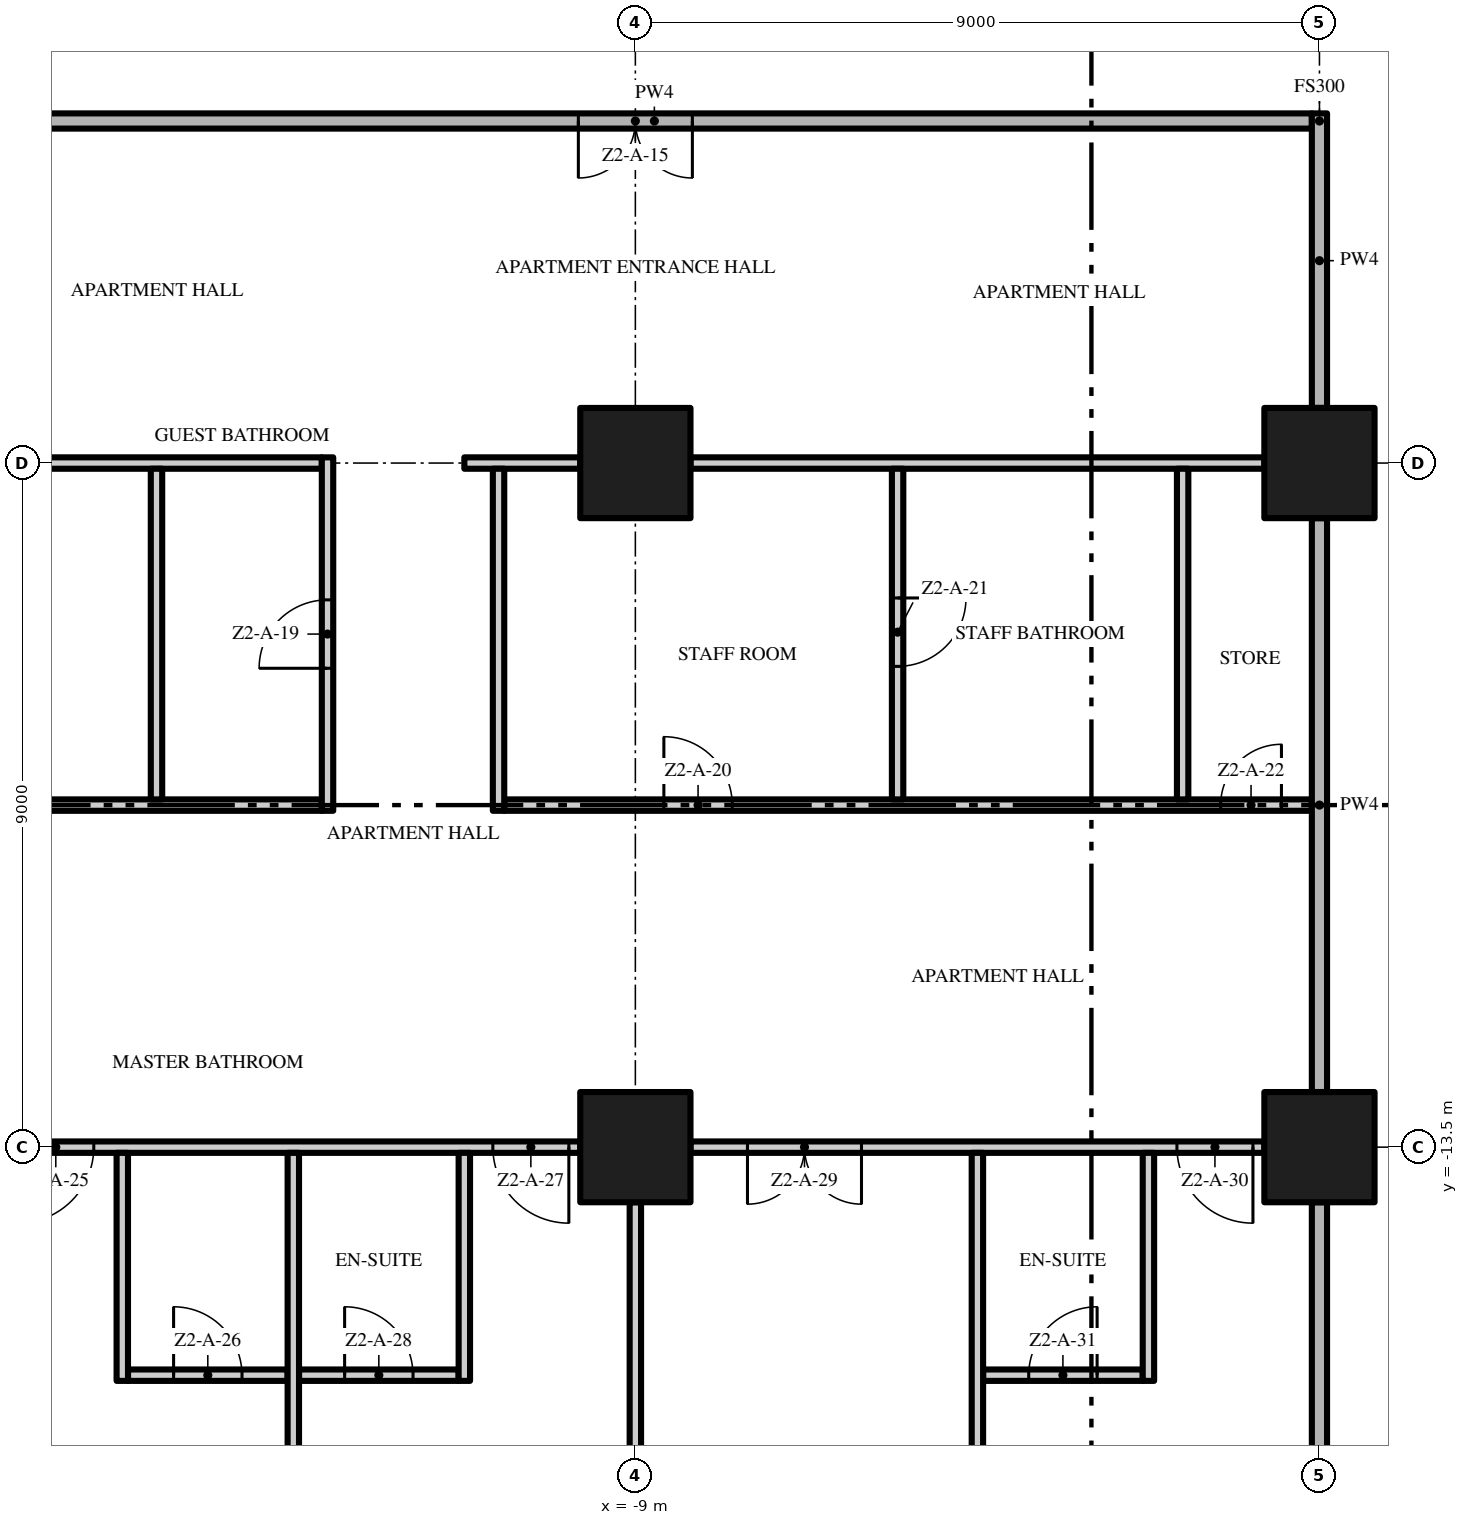
"""IFC4 building model, lengths in metres.
Left out: names, types, materials, properties, quantities, classifications, styles, units other than length and angle.
Written with IfcOpenShell. Run it as: python <this file> out.ifc"""

import sys

from ifc_helpers import new_model, si_unit, direction, frame, frame_2d, origin, origin_2d, place, context, subcontext, project, spatial, rectangle, extrude, element, fill, save


model = new_model("IFC4")
c1 = context("Model", 3, precision=1e-05, world=origin(), true_north=direction((0.0, 1.0)))
c2 = subcontext(c1, "Body", "Model", "MODEL_VIEW")
j1 = project(units=[si_unit("LENGTHUNIT", "METRE"), si_unit("PLANEANGLEUNIT", "RADIAN")], contexts=[c1])
p1 = place(None, origin())
s1 = spatial("IfcSite", under=j1, at=p1, CompositionType="ELEMENT")
p2 = place(p1, origin())
s2 = spatial("IfcBuilding", under=s1, at=p2, CompositionType="ELEMENT")
p3 = place(p2, frame((0.0, 0.0, 77.0)))
s3 = spatial("IfcBuildingStorey", under=s2, at=p3, CompositionType="ELEMENT", Elevation=77.0)
for number, where, z_axis, x_axis in (
    (1, (-9.0, -13.5, 0.0), (0.0, 0.0, 1.0), (1.0, 0.0, 0.0)),
    (2, (-9.0, -4.5, 0.0), (0.0, 0.0, 1.0), (1.0, 0.0, 0.0)),
    (3, (0.0, -13.5, 0.0), (0.0, 0.0, 1.0), (1.0, 0.0, 0.0)),
    (4, (0.0, -4.5, 0.0), (0.0, 0.0, 1.0), (1.0, 0.0, 0.0)),
):
    element("IfcColumn", number, at=place(p3, frame(where, z_axis=z_axis, x_axis=x_axis)), inside=s3, PredefinedType="COLUMN", context=c2, shape_type="SweptSolid", body=[
        extrude(rectangle(XDim=1.45, YDim=1.45, at=origin_2d()), origin(), (0.0, 0.0, 1.0), 3.5),
    ])
p4 = place(p3, frame((-15.675, -16.5, 0.0), z_axis=(0.0, 0.0, 1.0), x_axis=(1.0, 0.0, 0.0)))
e5 = element("IfcWall", 5, at=p4, inside=s3, PredefinedType="PARTITIONING", context=c2, shape_type="SweptSolid", body=[
    extrude(rectangle(XDim=2.1, YDim=0.15, at=frame_2d((1.05, 0.0))), origin(), (0.0, 0.0, 1.0), 3.5),
])
p5 = place(p4, frame((0.6, 0.0, 0.0)))
e6 = element("IfcOpeningElement", 6, at=p5, cuts=e5, PredefinedType="OPENING", context=c2, shape_type="SweptSolid", body=[
    extrude(rectangle(XDim=0.9, YDim=2.1, at=frame_2d((0.45, 1.05))), frame((0.0, 0.085, 0.0), z_axis=(0.0, -1.0, 0.0), x_axis=(1.0, 0.0, 0.0)), (0.0, 0.0, 1.0), 0.17),
])
p6 = place(p3, frame((-13.425, -16.5, 0.0), z_axis=(0.0, 0.0, 1.0), x_axis=(1.0, 0.0, 0.0)))
e7 = element("IfcWall", 7, at=p6, inside=s3, PredefinedType="PARTITIONING", context=c2, shape_type="SweptSolid", body=[
    extrude(rectangle(XDim=2.1, YDim=0.15, at=frame_2d((1.05, 0.0))), origin(), (0.0, 0.0, 1.0), 3.5),
])
p7 = place(p6, frame((0.6, 0.0, 0.0)))
e8 = element("IfcOpeningElement", 8, at=p7, cuts=e7, PredefinedType="OPENING", context=c2, shape_type="SweptSolid", body=[
    extrude(rectangle(XDim=0.9, YDim=2.1, at=frame_2d((0.45, 1.05))), frame((0.0, 0.085, 0.0), z_axis=(0.0, -1.0, 0.0), x_axis=(1.0, 0.0, 0.0)), (0.0, 0.0, 1.0), 0.17),
])
p8 = place(p3, frame((-4.425, -16.5, 0.0), z_axis=(0.0, 0.0, 1.0), x_axis=(1.0, 0.0, 0.0)))
e9 = element("IfcWall", 9, at=p8, inside=s3, PredefinedType="PARTITIONING", context=c2, shape_type="SweptSolid", body=[
    extrude(rectangle(XDim=2.1, YDim=0.15, at=frame_2d((1.05, 0.0))), origin(), (0.0, 0.0, 1.0), 3.5),
])
p9 = place(p8, frame((0.6, 0.0, 0.0)))
e10 = element("IfcOpeningElement", 10, at=p9, cuts=e9, PredefinedType="OPENING", context=c2, shape_type="SweptSolid", body=[
    extrude(rectangle(XDim=0.9, YDim=2.1, at=frame_2d((0.45, 1.05))), frame((0.0, 0.085, 0.0), z_axis=(0.0, -1.0, 0.0), x_axis=(1.0, 0.0, 0.0)), (0.0, 0.0, 1.0), 0.17),
])
p10 = place(p3, frame((-9.725, -13.5, 0.0), z_axis=(0.0, 0.0, 1.0), x_axis=(-1.0, 0.0, 0.0)))
e11 = element("IfcWall", 11, at=p10, inside=s3, PredefinedType="PARTITIONING", context=c2, shape_type="SweptSolid", body=[
    extrude(rectangle(XDim=7.55, YDim=0.15, at=frame_2d((3.775, 0.0))), origin(), (0.0, 0.0, 1.0), 3.5),
])
p11 = place(p10, frame((6.4, 0.0, 0.0)))
e12 = element("IfcOpeningElement", 12, at=p11, cuts=e11, PredefinedType="OPENING", context=c2, shape_type="SweptSolid", body=[
    extrude(rectangle(XDim=1.0, YDim=2.4, at=frame_2d((0.5, 1.2))), frame((0.0, 0.085, 0.0), z_axis=(0.0, -1.0, 0.0), x_axis=(1.0, 0.0, 0.0)), (0.0, 0.0, 1.0), 0.17),
])
p12 = place(p10, frame((0.15, 0.0, 0.0)))
e13 = element("IfcOpeningElement", 13, at=p12, cuts=e11, PredefinedType="OPENING", context=c2, shape_type="SweptSolid", body=[
    extrude(rectangle(XDim=1.0, YDim=2.4, at=frame_2d((0.5, 1.2))), frame((0.0, 0.085, 0.0), z_axis=(0.0, -1.0, 0.0), x_axis=(1.0, 0.0, 0.0)), (0.0, 0.0, 1.0), 0.17),
])
p13 = place(p3, frame((-0.725, -13.5, 0.0), z_axis=(0.0, 0.0, 1.0), x_axis=(-1.0, 0.0, 0.0)))
e14 = element("IfcWall", 14, at=p13, inside=s3, PredefinedType="PARTITIONING", context=c2, shape_type="SweptSolid", body=[
    extrude(rectangle(XDim=7.55, YDim=0.15, at=frame_2d((3.775, 0.0))), origin(), (0.0, 0.0, 1.0), 3.5),
])
p14 = place(p13, frame((5.3, 0.0, 0.0)))
e15 = element("IfcOpeningElement", 15, at=p14, cuts=e14, PredefinedType="OPENING", context=c2, shape_type="SweptSolid", body=[
    extrude(rectangle(XDim=1.5, YDim=2.4, at=frame_2d((0.75, 1.2))), frame((0.0, 0.085, 0.0), z_axis=(0.0, -1.0, 0.0), x_axis=(1.0, 0.0, 0.0)), (0.0, 0.0, 1.0), 0.17),
])
p15 = place(p13, frame((0.15, 0.0, 0.0)))
e16 = element("IfcOpeningElement", 16, at=p15, cuts=e14, PredefinedType="OPENING", context=c2, shape_type="SweptSolid", body=[
    extrude(rectangle(XDim=1.0, YDim=2.4, at=frame_2d((0.5, 1.2))), frame((0.0, 0.085, 0.0), z_axis=(0.0, -1.0, 0.0), x_axis=(1.0, 0.0, 0.0)), (0.0, 0.0, 1.0), 0.17),
])
p16 = place(p3, frame((-26.7, -9.0, 0.0), z_axis=(0.0, 0.0, 1.0), x_axis=(1.0, 0.0, 0.0)))
e17 = element("IfcWall", 17, at=p16, inside=s3, PredefinedType="PARTITIONING", context=c2, shape_type="SweptSolid", body=[
    extrude(rectangle(XDim=13.575, YDim=0.15, at=frame_2d((6.787, 0.0))), origin(), (0.0, 0.0, 1.0), 3.5),
])
p17 = place(p3, frame((-10.725, -9.0, 0.0), z_axis=(0.0, 0.0, 1.0), x_axis=(1.0, 0.0, 0.0)))
e18 = element("IfcWall", 18, at=p17, inside=s3, PredefinedType="PARTITIONING", context=c2, shape_type="SweptSolid", body=[
    extrude(rectangle(XDim=10.625, YDim=0.15, at=frame_2d((5.312, 0.0))), origin(), (0.0, 0.0, 1.0), 3.5),
])
p18 = place(p17, frame((2.1, 0.0, 0.0)))
e19 = element("IfcOpeningElement", 19, at=p18, cuts=e18, PredefinedType="OPENING", context=c2, shape_type="SweptSolid", body=[
    extrude(rectangle(XDim=0.9, YDim=2.1, at=frame_2d((0.45, 1.05))), frame((0.0, 0.085, 0.0), z_axis=(0.0, -1.0, 0.0), x_axis=(1.0, 0.0, 0.0)), (0.0, 0.0, 1.0), 0.17),
])
p19 = place(p17, frame((9.425, 0.0, 0.0)))
e20 = element("IfcOpeningElement", 20, at=p19, cuts=e18, PredefinedType="OPENING", context=c2, shape_type="SweptSolid", body=[
    extrude(rectangle(XDim=0.8, YDim=2.0, at=frame_2d((0.4, 1.0))), frame((0.0, 0.085, 0.0), z_axis=(0.0, -1.0, 0.0), x_axis=(1.0, 0.0, 0.0)), (0.0, 0.0, 1.0), 0.17),
])
p20 = place(p3, frame((-17.275, -4.5, 0.0), z_axis=(0.0, 0.0, 1.0), x_axis=(1.0, 0.0, 0.0)))
e21 = element("IfcWall", 21, at=p20, inside=s3, PredefinedType="PARTITIONING", context=c2, shape_type="SweptSolid", body=[
    extrude(rectangle(XDim=4.15, YDim=0.15, at=frame_2d((2.075, 0.0))), origin(), (0.0, 0.0, 1.0), 3.5),
])
p21 = place(p3, frame((-11.25, -4.5, 0.0), z_axis=(0.0, 0.0, 1.0), x_axis=(1.0, 0.0, 0.0)))
e22 = element("IfcWall", 22, at=p21, inside=s3, PredefinedType="PARTITIONING", context=c2, shape_type="SweptSolid", body=[
    extrude(rectangle(XDim=1.525, YDim=0.15, at=frame_2d((0.762, 0.0))), origin(), (0.0, 0.0, 1.0), 3.5),
])
p22 = place(p3, frame((-8.275, -4.5, 0.0), z_axis=(0.0, 0.0, 1.0), x_axis=(1.0, 0.0, 0.0)))
e23 = element("IfcWall", 23, at=p22, inside=s3, PredefinedType="PARTITIONING", context=c2, shape_type="SweptSolid", body=[
    extrude(rectangle(XDim=7.55, YDim=0.15, at=frame_2d((3.775, 0.0))), origin(), (0.0, 0.0, 1.0), 3.5),
])
p23 = place(p3, frame((-0.1, 0.0, 0.0), z_axis=(0.0, 0.0, 1.0), x_axis=(-1.0, 0.0, 0.0)))
e24 = element("IfcWall", 24, at=p23, inside=s3, PredefinedType="PARTITIONING", context=c2, shape_type="SweptSolid", body=[
    extrude(rectangle(XDim=17.3, YDim=0.2, at=frame_2d((8.65, 0.0))), origin(), (0.0, 0.0, 1.0), 3.5),
])
p24 = place(p23, frame((8.15, 0.0, 0.0)))
e25 = element("IfcOpeningElement", 25, at=p24, cuts=e24, PredefinedType="OPENING", context=c2, shape_type="SweptSolid", body=[
    extrude(rectangle(XDim=1.5, YDim=2.4, at=frame_2d((0.75, 1.2))), frame((0.0, 0.11, 0.0), z_axis=(0.0, -1.0, 0.0), x_axis=(1.0, 0.0, 0.0)), (0.0, 0.0, 1.0), 0.22),
])
p25 = place(p3, frame((-15.75, -16.575, 0.0), z_axis=(0.0, 0.0, 1.0), x_axis=(0.0, 1.0, 0.0)))
e26 = element("IfcWall", 26, at=p25, inside=s3, PredefinedType="PARTITIONING", context=c2, shape_type="SweptSolid", body=[
    extrude(rectangle(XDim=3.0, YDim=0.15, at=frame_2d((1.5, 0.0))), origin(), (0.0, 0.0, 1.0), 3.5),
])
p26 = place(p3, frame((-15.3, -8.925, 0.0), z_axis=(0.0, 0.0, 1.0), x_axis=(0.0, 1.0, 0.0)))
e27 = element("IfcWall", 27, at=p26, inside=s3, PredefinedType="PARTITIONING", context=c2, shape_type="SweptSolid", body=[
    extrude(rectangle(XDim=4.35, YDim=0.15, at=frame_2d((2.175, 0.0))), origin(), (0.0, 0.0, 1.0), 3.5),
])
p27 = place(p3, frame((-13.5, -22.2, 0.0), z_axis=(0.0, 0.0, 1.0), x_axis=(0.0, 1.0, 0.0)))
e28 = element("IfcWall", 28, at=p27, inside=s3, PredefinedType="PARTITIONING", context=c2, shape_type="SweptSolid", body=[
    extrude(rectangle(XDim=8.625, YDim=0.15, at=frame_2d((4.312, 0.0))), origin(), (0.0, 0.0, 1.0), 3.5),
])
p28 = place(p3, frame((-13.05, -9.075, 0.0), z_axis=(0.0, 0.0, 1.0), x_axis=(0.0, 1.0, 0.0)))
e29 = element("IfcWall", 29, at=p28, inside=s3, PredefinedType="PARTITIONING", context=c2, shape_type="SweptSolid", body=[
    extrude(rectangle(XDim=4.65, YDim=0.15, at=frame_2d((2.325, 0.0))), origin(), (0.0, 0.0, 1.0), 3.5),
])
p29 = place(p28, frame((1.875, 0.0, 0.0)))
e30 = element("IfcOpeningElement", 30, at=p29, cuts=e29, PredefinedType="OPENING", context=c2, shape_type="SweptSolid", body=[
    extrude(rectangle(XDim=0.9, YDim=2.1, at=frame_2d((0.45, 1.05))), frame((0.0, 0.085, 0.0), z_axis=(0.0, -1.0, 0.0), x_axis=(1.0, 0.0, 0.0)), (0.0, 0.0, 1.0), 0.17),
])
p30 = place(p3, frame((-11.25, -16.575, 0.0), z_axis=(0.0, 0.0, 1.0), x_axis=(0.0, 1.0, 0.0)))
e31 = element("IfcWall", 31, at=p30, inside=s3, PredefinedType="PARTITIONING", context=c2, shape_type="SweptSolid", body=[
    extrude(rectangle(XDim=3.0, YDim=0.15, at=frame_2d((1.5, 0.0))), origin(), (0.0, 0.0, 1.0), 3.5),
])
p31 = place(p3, frame((-10.8, -9.075, 0.0), z_axis=(0.0, 0.0, 1.0), x_axis=(0.0, 1.0, 0.0)))
e32 = element("IfcWall", 32, at=p31, inside=s3, PredefinedType="PARTITIONING", context=c2, shape_type="SweptSolid", body=[
    extrude(rectangle(XDim=4.5, YDim=0.15, at=frame_2d((2.25, 0.0))), origin(), (0.0, 0.0, 1.0), 3.5),
])
p32 = place(p3, frame((-9.0, -21.15, 0.0), z_axis=(0.0, 0.0, 1.0), x_axis=(0.0, 1.0, 0.0)))
e33 = element("IfcWall", 33, at=p32, inside=s3, PredefinedType="PARTITIONING", context=c2, shape_type="SweptSolid", body=[
    extrude(rectangle(XDim=6.925, YDim=0.15, at=frame_2d((3.462, 0.0))), origin(), (0.0, 0.0, 1.0), 3.5),
])
p33 = place(p3, frame((-5.55, -4.575, 0.0), z_axis=(0.0, 0.0, 1.0), x_axis=(0.0, -1.0, 0.0)))
e34 = element("IfcWall", 34, at=p33, inside=s3, PredefinedType="PARTITIONING", context=c2, shape_type="SweptSolid", body=[
    extrude(rectangle(XDim=4.35, YDim=0.15, at=frame_2d((2.175, 0.0))), origin(), (0.0, 0.0, 1.0), 3.5),
])
p34 = place(p33, frame((1.7, 0.0, 0.0)))
e35 = element("IfcOpeningElement", 35, at=p34, cuts=e34, PredefinedType="OPENING", context=c2, shape_type="SweptSolid", body=[
    extrude(rectangle(XDim=0.9, YDim=2.1, at=frame_2d((0.45, 1.05))), frame((0.0, 0.085, 0.0), z_axis=(0.0, -1.0, 0.0), x_axis=(1.0, 0.0, 0.0)), (0.0, 0.0, 1.0), 0.17),
])
p35 = place(p3, frame((-4.5, -22.2, 0.0), z_axis=(0.0, 0.0, 1.0), x_axis=(0.0, 1.0, 0.0)))
e36 = element("IfcWall", 36, at=p35, inside=s3, PredefinedType="PARTITIONING", context=c2, shape_type="SweptSolid", body=[
    extrude(rectangle(XDim=8.625, YDim=0.15, at=frame_2d((4.312, 0.0))), origin(), (0.0, 0.0, 1.0), 3.5),
])
p36 = place(p3, frame((-2.25, -16.575, 0.0), z_axis=(0.0, 0.0, 1.0), x_axis=(0.0, 1.0, 0.0)))
e37 = element("IfcWall", 37, at=p36, inside=s3, PredefinedType="PARTITIONING", context=c2, shape_type="SweptSolid", body=[
    extrude(rectangle(XDim=3.0, YDim=0.15, at=frame_2d((1.5, 0.0))), origin(), (0.0, 0.0, 1.0), 3.5),
])
p37 = place(p3, frame((-1.8, -8.925, 0.0), z_axis=(0.0, 0.0, 1.0), x_axis=(0.0, 1.0, 0.0)))
e38 = element("IfcWall", 38, at=p37, inside=s3, PredefinedType="PARTITIONING", context=c2, shape_type="SweptSolid", body=[
    extrude(rectangle(XDim=4.35, YDim=0.15, at=frame_2d((2.175, 0.0))), origin(), (0.0, 0.0, 1.0), 3.5),
])
p38 = place(p3, frame((0.0, -21.15, 0.0), z_axis=(0.0, 0.0, 1.0), x_axis=(0.0, 1.0, 0.0)))
e39 = element("IfcWall", 39, at=p38, inside=s3, PredefinedType="PARTITIONING", context=c2, shape_type="SweptSolid", body=[
    extrude(rectangle(XDim=6.925, YDim=0.2, at=frame_2d((3.462, 0.0))), origin(), (0.0, 0.0, 1.0), 3.5),
])
p39 = place(p3, frame((0.0, -12.775, 0.0), z_axis=(0.0, 0.0, 1.0), x_axis=(0.0, 1.0, 0.0)))
e40 = element("IfcWall", 40, at=p39, inside=s3, PredefinedType="PARTITIONING", context=c2, shape_type="SweptSolid", body=[
    extrude(rectangle(XDim=7.55, YDim=0.2, at=frame_2d((3.775, 0.0))), origin(), (0.0, 0.0, 1.0), 3.5),
])
p40 = place(p3, frame((0.0, -3.775, 0.0), z_axis=(0.0, 0.0, 1.0), x_axis=(0.0, 1.0, 0.0)))
e41 = element("IfcWall", 41, at=p40, inside=s3, PredefinedType="PARTITIONING", context=c2, shape_type="SweptSolid", body=[
    extrude(rectangle(XDim=3.875, YDim=0.2, at=frame_2d((1.938, 0.0))), origin(), (0.0, 0.0, 1.0), 3.5),
])
p41 = place(p24, origin())
e42 = element("IfcDoor", 42, at=p41, inside=s3, OperationType="DOUBLE_DOOR_SINGLE_SWING", PredefinedType="DOOR", context=c2, shape_type="SweptSolid", body=[
    extrude(rectangle(XDim=1.5, YDim=2.4, at=frame_2d((0.75, 1.2))), frame((0.0, 0.025, 0.0), z_axis=(0.0, -1.0, 0.0), x_axis=(1.0, 0.0, 0.0)), (0.0, 0.0, 1.0), 0.05),
])
fill(e25, e42)
p42 = place(p29, origin())
e43 = element("IfcDoor", 43, at=p42, inside=s3, OperationType="SINGLE_SWING_LEFT", PredefinedType="DOOR", context=c2, shape_type="SweptSolid", body=[
    extrude(rectangle(XDim=0.9, YDim=2.1, at=frame_2d((0.45, 1.05))), frame((0.0, 0.025, 0.0), z_axis=(0.0, -1.0, 0.0), x_axis=(1.0, 0.0, 0.0)), (0.0, 0.0, 1.0), 0.05),
])
fill(e30, e43)
p43 = place(p18, origin())
e44 = element("IfcDoor", 44, at=p43, inside=s3, OperationType="SINGLE_SWING_LEFT", PredefinedType="DOOR", context=c2, shape_type="SweptSolid", body=[
    extrude(rectangle(XDim=0.9, YDim=2.1, at=frame_2d((0.45, 1.05))), frame((0.0, 0.025, 0.0), z_axis=(0.0, -1.0, 0.0), x_axis=(1.0, 0.0, 0.0)), (0.0, 0.0, 1.0), 0.05),
])
fill(e19, e44)
p44 = place(p34, origin())
e45 = element("IfcDoor", 45, at=p44, inside=s3, OperationType="SINGLE_SWING_LEFT", PredefinedType="DOOR", context=c2, shape_type="SweptSolid", body=[
    extrude(rectangle(XDim=0.9, YDim=2.1, at=frame_2d((0.45, 1.05))), frame((0.0, 0.025, 0.0), z_axis=(0.0, -1.0, 0.0), x_axis=(1.0, 0.0, 0.0)), (0.0, 0.0, 1.0), 0.05),
])
fill(e35, e45)
p45 = place(p19, origin())
e46 = element("IfcDoor", 46, at=p45, inside=s3, OperationType="SINGLE_SWING_RIGHT", PredefinedType="DOOR", context=c2, shape_type="SweptSolid", body=[
    extrude(rectangle(XDim=0.8, YDim=2.0, at=frame_2d((0.4, 1.0))), frame((0.0, 0.025, 0.0), z_axis=(0.0, -1.0, 0.0), x_axis=(1.0, 0.0, 0.0)), (0.0, 0.0, 1.0), 0.05),
])
fill(e20, e46)
p46 = place(p11, origin())
e47 = element("IfcDoor", 47, at=p46, inside=s3, OperationType="SINGLE_SWING_RIGHT", PredefinedType="DOOR", context=c2, shape_type="SweptSolid", body=[
    extrude(rectangle(XDim=1.0, YDim=2.4, at=frame_2d((0.5, 1.2))), frame((0.0, 0.025, 0.0), z_axis=(0.0, -1.0, 0.0), x_axis=(1.0, 0.0, 0.0)), (0.0, 0.0, 1.0), 0.05),
])
fill(e12, e47)
p47 = place(p5, origin())
e48 = element("IfcDoor", 48, at=p47, inside=s3, OperationType="SINGLE_SWING_LEFT", PredefinedType="DOOR", context=c2, shape_type="SweptSolid", body=[
    extrude(rectangle(XDim=0.9, YDim=2.1, at=frame_2d((0.45, 1.05))), frame((0.0, 0.025, 0.0), z_axis=(0.0, -1.0, 0.0), x_axis=(1.0, 0.0, 0.0)), (0.0, 0.0, 1.0), 0.05),
])
fill(e6, e48)
p48 = place(p12, origin())
e49 = element("IfcDoor", 49, at=p48, inside=s3, OperationType="SINGLE_SWING_LEFT", PredefinedType="DOOR", context=c2, shape_type="SweptSolid", body=[
    extrude(rectangle(XDim=1.0, YDim=2.4, at=frame_2d((0.5, 1.2))), frame((0.0, 0.025, 0.0), z_axis=(0.0, -1.0, 0.0), x_axis=(1.0, 0.0, 0.0)), (0.0, 0.0, 1.0), 0.05),
])
fill(e13, e49)
p49 = place(p7, origin())
e50 = element("IfcDoor", 50, at=p49, inside=s3, OperationType="SINGLE_SWING_LEFT", PredefinedType="DOOR", context=c2, shape_type="SweptSolid", body=[
    extrude(rectangle(XDim=0.9, YDim=2.1, at=frame_2d((0.45, 1.05))), frame((0.0, 0.025, 0.0), z_axis=(0.0, -1.0, 0.0), x_axis=(1.0, 0.0, 0.0)), (0.0, 0.0, 1.0), 0.05),
])
fill(e8, e50)
p50 = place(p14, origin())
e51 = element("IfcDoor", 51, at=p50, inside=s3, OperationType="DOUBLE_DOOR_SINGLE_SWING", PredefinedType="DOOR", context=c2, shape_type="SweptSolid", body=[
    extrude(rectangle(XDim=1.5, YDim=2.4, at=frame_2d((0.75, 1.2))), frame((0.0, 0.025, 0.0), z_axis=(0.0, -1.0, 0.0), x_axis=(1.0, 0.0, 0.0)), (0.0, 0.0, 1.0), 0.05),
])
fill(e15, e51)
p51 = place(p15, origin())
e52 = element("IfcDoor", 52, at=p51, inside=s3, OperationType="SINGLE_SWING_LEFT", PredefinedType="DOOR", context=c2, shape_type="SweptSolid", body=[
    extrude(rectangle(XDim=1.0, YDim=2.4, at=frame_2d((0.5, 1.2))), frame((0.0, 0.025, 0.0), z_axis=(0.0, -1.0, 0.0), x_axis=(1.0, 0.0, 0.0)), (0.0, 0.0, 1.0), 0.05),
])
fill(e16, e52)
p52 = place(p9, origin())
e53 = element("IfcDoor", 53, at=p52, inside=s3, OperationType="SINGLE_SWING_RIGHT", PredefinedType="DOOR", context=c2, shape_type="SweptSolid", body=[
    extrude(rectangle(XDim=0.9, YDim=2.1, at=frame_2d((0.45, 1.05))), frame((0.0, 0.025, 0.0), z_axis=(0.0, -1.0, 0.0), x_axis=(1.0, 0.0, 0.0)), (0.0, 0.0, 1.0), 0.05),
])
fill(e10, e53)
save(model, sys.argv[1])
